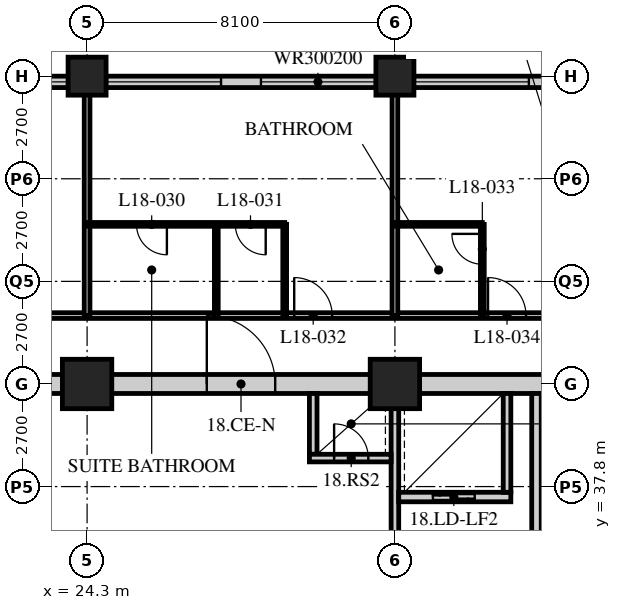
"""IFC4 building model, lengths in metres.
Left out: names, types, materials, properties, quantities, classifications, styles, units other than length and angle.
Written with IfcOpenShell. Run it as: python <this file> out.ifc"""

import sys

from ifc_helpers import new_model, si_unit, direction, frame, frame_2d, origin, origin_2d, place, context, subcontext, project, spatial, rectangle, hollow_rectangle, extrude, element, fill, save


model = new_model("IFC4")
c1 = context("Model", 3, precision=1e-05, world=origin(), true_north=direction((0.0, 1.0)))
c2 = subcontext(c1, "Body", "Model", "MODEL_VIEW")
j1 = project(units=[si_unit("LENGTHUNIT", "METRE"), si_unit("PLANEANGLEUNIT", "RADIAN")], contexts=[c1])
p1 = place(None, origin())
s1 = spatial("IfcSite", under=j1, at=p1, CompositionType="ELEMENT")
p2 = place(p1, origin())
s2 = spatial("IfcBuilding", under=s1, at=p2, CompositionType="ELEMENT")
p3 = place(p2, frame((0.0, 0.0, 73.8)))
s3 = spatial("IfcBuildingStorey", under=s2, at=p3, CompositionType="ELEMENT", Elevation=73.8)
p4 = place(p3, frame((24.3, 40.5, 0.0), z_axis=(0.0, 0.0, 1.0), x_axis=(1.0, 0.0, 0.0)))
e1 = element("IfcColumn", 1, at=p4, inside=s3, PredefinedType="COLUMN", context=c2, shape_type="SweptSolid", body=[
    extrude(hollow_rectangle(XDim=1.3, YDim=1.3, WallThickness=0.13, at=origin_2d()), origin(), (0.0, 0.0, 1.0), 3.4),
])
p5 = place(p3, frame((24.3, 48.6, 0.0), z_axis=(0.0, 0.0, 1.0), x_axis=(1.0, 0.0, 0.0)))
e2 = element("IfcColumn", 2, at=p5, inside=s3, PredefinedType="COLUMN", context=c2, shape_type="SweptSolid", body=[
    extrude(hollow_rectangle(XDim=1.0, YDim=1.0, WallThickness=0.1, at=origin_2d()), origin(), (0.0, 0.0, 1.0), 3.4),
])
p6 = place(p3, frame((32.4, 40.5, 0.0), z_axis=(0.0, 0.0, 1.0), x_axis=(1.0, 0.0, 0.0)))
e3 = element("IfcColumn", 3, at=p6, inside=s3, PredefinedType="COLUMN", context=c2, shape_type="SweptSolid", body=[
    extrude(hollow_rectangle(XDim=1.3, YDim=1.3, WallThickness=0.13, at=origin_2d()), origin(), (0.0, 0.0, 1.0), 3.4),
])
p7 = place(p3, frame((32.4, 48.6, 0.0), z_axis=(0.0, 0.0, 1.0), x_axis=(1.0, 0.0, 0.0)))
e4 = element("IfcColumn", 4, at=p7, inside=s3, PredefinedType="COLUMN", context=c2, shape_type="SweptSolid", body=[
    extrude(hollow_rectangle(XDim=1.0, YDim=1.0, WallThickness=0.1, at=origin_2d()), origin(), (0.0, 0.0, 1.0), 3.4),
])
p8 = place(p3, frame((48.3, 48.45, 0.0), z_axis=(0.0, 0.0, 1.0), x_axis=(-1.0, 0.0, 0.0)))
e5 = element("IfcWall", 5, at=p8, inside=s3, PredefinedType="SOLIDWALL", context=c2, shape_type="SweptSolid", body=[
    extrude(rectangle(XDim=40.2, YDim=0.3, at=frame_2d((20.1, 0.0))), origin(), (0.0, 0.0, 1.0), 3.19),
])
p9 = place(p8, frame((0.225, 0.0, 0.9)))
e6 = element("IfcOpeningElement", 6, at=p9, cuts=e5, PredefinedType="OPENING", context=c2, shape_type="SweptSolid", body=[
    extrude(rectangle(XDim=3.0, YDim=2.0, at=frame_2d((1.5, 1.0))), frame((0.0, 0.16, 0.0), z_axis=(0.0, -1.0, 0.0), x_axis=(1.0, 0.0, 0.0)), (0.0, 0.0, 1.0), 0.32),
])
p10 = place(p8, frame((4.275, 0.0, 0.9)))
e7 = element("IfcOpeningElement", 7, at=p10, cuts=e5, PredefinedType="OPENING", context=c2, shape_type="SweptSolid", body=[
    extrude(rectangle(XDim=3.0, YDim=2.0, at=frame_2d((1.5, 1.0))), frame((0.0, 0.16, 0.0), z_axis=(0.0, -1.0, 0.0), x_axis=(1.0, 0.0, 0.0)), (0.0, 0.0, 1.0), 0.32),
])
p11 = place(p8, frame((8.325, 0.0, 0.9)))
e8 = element("IfcOpeningElement", 8, at=p11, cuts=e5, PredefinedType="OPENING", context=c2, shape_type="SweptSolid", body=[
    extrude(rectangle(XDim=3.0, YDim=2.0, at=frame_2d((1.5, 1.0))), frame((0.0, 0.16, 0.0), z_axis=(0.0, -1.0, 0.0), x_axis=(1.0, 0.0, 0.0)), (0.0, 0.0, 1.0), 0.32),
])
p12 = place(p8, frame((12.375, 0.0, 0.9)))
e9 = element("IfcOpeningElement", 9, at=p12, cuts=e5, PredefinedType="OPENING", context=c2, shape_type="SweptSolid", body=[
    extrude(rectangle(XDim=3.0, YDim=2.0, at=frame_2d((1.5, 1.0))), frame((0.0, 0.16, 0.0), z_axis=(0.0, -1.0, 0.0), x_axis=(1.0, 0.0, 0.0)), (0.0, 0.0, 1.0), 0.32),
])
p13 = place(p8, frame((16.425, 0.0, 0.9)))
e10 = element("IfcOpeningElement", 10, at=p13, cuts=e5, PredefinedType="OPENING", context=c2, shape_type="SweptSolid", body=[
    extrude(rectangle(XDim=3.0, YDim=2.0, at=frame_2d((1.5, 1.0))), frame((0.0, 0.16, 0.0), z_axis=(0.0, -1.0, 0.0), x_axis=(1.0, 0.0, 0.0)), (0.0, 0.0, 1.0), 0.32),
])
p14 = place(p8, frame((20.475, 0.0, 0.9)))
e11 = element("IfcOpeningElement", 11, at=p14, cuts=e5, PredefinedType="OPENING", context=c2, shape_type="SweptSolid", body=[
    extrude(rectangle(XDim=3.0, YDim=2.0, at=frame_2d((1.5, 1.0))), frame((0.0, 0.16, 0.0), z_axis=(0.0, -1.0, 0.0), x_axis=(1.0, 0.0, 0.0)), (0.0, 0.0, 1.0), 0.32),
])
p15 = place(p8, frame((24.525, 0.0, 0.9)))
e12 = element("IfcOpeningElement", 12, at=p15, cuts=e5, PredefinedType="OPENING", context=c2, shape_type="SweptSolid", body=[
    extrude(rectangle(XDim=3.0, YDim=2.0, at=frame_2d((1.5, 1.0))), frame((0.0, 0.16, 0.0), z_axis=(0.0, -1.0, 0.0), x_axis=(1.0, 0.0, 0.0)), (0.0, 0.0, 1.0), 0.32),
])
p16 = place(p8, frame((28.575, 0.0, 0.9)))
e13 = element("IfcOpeningElement", 13, at=p16, cuts=e5, PredefinedType="OPENING", context=c2, shape_type="SweptSolid", body=[
    extrude(rectangle(XDim=3.0, YDim=2.0, at=frame_2d((1.5, 1.0))), frame((0.0, 0.16, 0.0), z_axis=(0.0, -1.0, 0.0), x_axis=(1.0, 0.0, 0.0)), (0.0, 0.0, 1.0), 0.32),
])
p17 = place(p8, frame((32.625, 0.0, 0.9)))
e14 = element("IfcOpeningElement", 14, at=p17, cuts=e5, PredefinedType="OPENING", context=c2, shape_type="SweptSolid", body=[
    extrude(rectangle(XDim=3.0, YDim=2.0, at=frame_2d((1.5, 1.0))), frame((0.0, 0.16, 0.0), z_axis=(0.0, -1.0, 0.0), x_axis=(1.0, 0.0, 0.0)), (0.0, 0.0, 1.0), 0.32),
])
p18 = place(p8, frame((36.675, 0.0, 0.9)))
e15 = element("IfcOpeningElement", 15, at=p18, cuts=e5, PredefinedType="OPENING", context=c2, shape_type="SweptSolid", body=[
    extrude(rectangle(XDim=3.0, YDim=2.0, at=frame_2d((1.5, 1.0))), frame((0.0, 0.16, 0.0), z_axis=(0.0, -1.0, 0.0), x_axis=(1.0, 0.0, 0.0)), (0.0, 0.0, 1.0), 0.32),
])
p19 = place(p3, frame((12.15, 42.3, 0.0), z_axis=(0.0, 0.0, 1.0), x_axis=(1.0, 0.0, 0.0)))
e16 = element("IfcWall", 16, at=p19, inside=s3, PredefinedType="PARTITIONING", context=c2, shape_type="SweptSolid", body=[
    extrude(rectangle(XDim=36.45, YDim=0.15, at=frame_2d((18.225, 0.0))), origin(), (0.0, 0.0, 1.0), 3.19),
])
p20 = place(p19, frame((9.5, 0.0, 0.0)))
e17 = element("IfcOpeningElement", 17, at=p20, cuts=e16, PredefinedType="OPENING", context=c2, shape_type="SweptSolid", body=[
    extrude(rectangle(XDim=1.0, YDim=2.1, at=frame_2d((0.5, 1.05))), frame((0.0, 0.085, 0.0), z_axis=(0.0, -1.0, 0.0), x_axis=(1.0, 0.0, 0.0)), (0.0, 0.0, 1.0), 0.17),
])
p21 = place(p19, frame((17.6, 0.0, 0.0)))
e18 = element("IfcOpeningElement", 18, at=p21, cuts=e16, PredefinedType="OPENING", context=c2, shape_type="SweptSolid", body=[
    extrude(rectangle(XDim=1.0, YDim=2.1, at=frame_2d((0.5, 1.05))), frame((0.0, 0.085, 0.0), z_axis=(0.0, -1.0, 0.0), x_axis=(1.0, 0.0, 0.0)), (0.0, 0.0, 1.0), 0.17),
])
p22 = place(p19, frame((22.7, 0.0, 0.0)))
e19 = element("IfcOpeningElement", 19, at=p22, cuts=e16, PredefinedType="OPENING", context=c2, shape_type="SweptSolid", body=[
    extrude(rectangle(XDim=1.0, YDim=2.1, at=frame_2d((0.5, 1.05))), frame((0.0, 0.085, 0.0), z_axis=(0.0, -1.0, 0.0), x_axis=(1.0, 0.0, 0.0)), (0.0, 0.0, 1.0), 0.17),
])
p23 = place(p19, frame((26.75, 0.0, 0.0)))
e20 = element("IfcOpeningElement", 20, at=p23, cuts=e16, PredefinedType="OPENING", context=c2, shape_type="SweptSolid", body=[
    extrude(rectangle(XDim=1.0, YDim=2.1, at=frame_2d((0.5, 1.05))), frame((0.0, 0.085, 0.0), z_axis=(0.0, -1.0, 0.0), x_axis=(1.0, 0.0, 0.0)), (0.0, 0.0, 1.0), 0.17),
])
p24 = place(p19, frame((30.8, 0.0, 0.0)))
e21 = element("IfcOpeningElement", 21, at=p24, cuts=e16, PredefinedType="OPENING", context=c2, shape_type="SweptSolid", body=[
    extrude(rectangle(XDim=1.0, YDim=2.1, at=frame_2d((0.5, 1.05))), frame((0.0, 0.085, 0.0), z_axis=(0.0, -1.0, 0.0), x_axis=(1.0, 0.0, 0.0)), (0.0, 0.0, 1.0), 0.17),
])
p25 = place(p19, frame((32.825, 0.0, 0.0)))
e22 = element("IfcOpeningElement", 22, at=p25, cuts=e16, PredefinedType="OPENING", context=c2, shape_type="SweptSolid", body=[
    extrude(rectangle(XDim=1.0, YDim=2.1, at=frame_2d((0.5, 1.05))), frame((0.0, 0.085, 0.0), z_axis=(0.0, -1.0, 0.0), x_axis=(1.0, 0.0, 0.0)), (0.0, 0.0, 1.0), 0.17),
])
p26 = place(p19, frame((2.625, 0.0, 0.0)))
e23 = element("IfcOpeningElement", 23, at=p26, cuts=e16, PredefinedType="OPENING", context=c2, shape_type="SweptSolid", body=[
    extrude(rectangle(XDim=1.0, YDim=2.1, at=frame_2d((0.5, 1.05))), frame((0.0, 0.085, 0.0), z_axis=(0.0, -1.0, 0.0), x_axis=(1.0, 0.0, 0.0)), (0.0, 0.0, 1.0), 0.17),
])
p27 = place(p3, frame((24.3, 42.3, 0.0), z_axis=(0.0, 0.0, 1.0), x_axis=(0.0, 1.0, 0.0)))
e24 = element("IfcWall", 24, at=p27, inside=s3, PredefinedType="PARTITIONING", context=c2, shape_type="SweptSolid", body=[
    extrude(rectangle(XDim=6.0, YDim=0.15, at=frame_2d((3.0, 0.0))), origin(), (0.0, 0.0, 1.0), 2.578),
])
p28 = place(p3, frame((24.3, 44.7, 0.0), z_axis=(0.0, 0.0, 1.0), x_axis=(1.0, 0.0, 0.0)))
e25 = element("IfcWall", 25, at=p28, inside=s3, PredefinedType="PARTITIONING", context=c2, shape_type="SweptSolid", body=[
    extrude(rectangle(XDim=5.2, YDim=0.1, at=frame_2d((2.6, 0.0))), origin(), (0.0, 0.0, 1.0), 3.19),
])
p29 = place(p28, frame((1.3, 0.0, 0.0)))
e26 = element("IfcOpeningElement", 26, at=p29, cuts=e25, PredefinedType="OPENING", context=c2, shape_type="SweptSolid", body=[
    extrude(rectangle(XDim=0.8, YDim=2.1, at=frame_2d((0.4, 1.05))), frame((0.0, 0.06, 0.0), z_axis=(0.0, -1.0, 0.0), x_axis=(1.0, 0.0, 0.0)), (0.0, 0.0, 1.0), 0.12),
])
p30 = place(p28, frame((3.9, 0.0, 0.0)))
e27 = element("IfcOpeningElement", 27, at=p30, cuts=e25, PredefinedType="OPENING", context=c2, shape_type="SweptSolid", body=[
    extrude(rectangle(XDim=0.8, YDim=2.1, at=frame_2d((0.4, 1.05))), frame((0.0, 0.06, 0.0), z_axis=(0.0, -1.0, 0.0), x_axis=(1.0, 0.0, 0.0)), (0.0, 0.0, 1.0), 0.12),
])
for number, where, z_axis, x_axis in (
    (28, (27.7, 42.3, 0.0), (0.0, 0.0, 1.0), (0.0, 1.0, 0.0)),
    (29, (29.5, 42.3, 0.0), (0.0, 0.0, 1.0), (0.0, 1.0, 0.0)),
):
    element("IfcWall", number, at=place(p3, frame(where, z_axis=z_axis, x_axis=x_axis)), inside=s3, PredefinedType="PARTITIONING", context=c2, shape_type="SweptSolid", body=[
        extrude(rectangle(XDim=2.4, YDim=0.1, at=frame_2d((1.2, 0.0))), origin(), (0.0, 0.0, 1.0), 3.19),
    ])
p31 = place(p3, frame((32.4, 42.3, 0.0), z_axis=(0.0, 0.0, 1.0), x_axis=(0.0, 1.0, 0.0)))
e30 = element("IfcWall", 30, at=p31, inside=s3, PredefinedType="PARTITIONING", context=c2, shape_type="SweptSolid", body=[
    extrude(rectangle(XDim=6.0, YDim=0.15, at=frame_2d((3.0, 0.0))), origin(), (0.0, 0.0, 1.0), 2.578),
])
p32 = place(p3, frame((32.4, 44.7, 0.0), z_axis=(0.0, 0.0, 1.0), x_axis=(1.0, 0.0, 0.0)))
e31 = element("IfcWall", 31, at=p32, inside=s3, PredefinedType="PARTITIONING", context=c2, shape_type="SweptSolid", body=[
    extrude(rectangle(XDim=2.3, YDim=0.1, at=frame_2d((1.15, 0.0))), origin(), (0.0, 0.0, 1.0), 3.19),
])
p33 = place(p3, frame((34.7, 42.3, 0.0), z_axis=(0.0, 0.0, 1.0), x_axis=(0.0, 1.0, 0.0)))
e32 = element("IfcWall", 32, at=p33, inside=s3, PredefinedType="PARTITIONING", context=c2, shape_type="SweptSolid", body=[
    extrude(rectangle(XDim=2.4, YDim=0.1, at=frame_2d((1.2, 0.0))), origin(), (0.0, 0.0, 1.0), 3.19),
])
p34 = place(p33, frame((1.35, 0.0, 0.0)))
e33 = element("IfcOpeningElement", 33, at=p34, cuts=e32, PredefinedType="OPENING", context=c2, shape_type="SweptSolid", body=[
    extrude(rectangle(XDim=0.8, YDim=2.1, at=frame_2d((0.4, 1.05))), frame((0.0, 0.06, 0.0), z_axis=(0.0, -1.0, 0.0), x_axis=(1.0, 0.0, 0.0)), (0.0, 0.0, 1.0), 0.12),
])
p35 = place(p3, frame((15.95, 40.5, 0.0), z_axis=(0.0, 0.0, 1.0), x_axis=(1.0, 0.0, 0.0)))
e34 = element("IfcWall", 34, at=p35, inside=s3, PredefinedType="SOLIDWALL", context=c2, shape_type="SweptSolid", body=[
    extrude(rectangle(XDim=24.8, YDim=0.5, at=frame_2d((12.4, 0.0))), origin(), (0.0, 0.0, 1.0), 2.54),
])
p36 = place(p35, frame((11.5, 0.0, 0.0)))
e35 = element("IfcOpeningElement", 35, at=p36, cuts=e34, PredefinedType="OPENING", context=c2, shape_type="SweptSolid", body=[
    extrude(rectangle(XDim=1.8, YDim=2.4, at=frame_2d((0.9, 1.2))), frame((0.0, 0.26, 0.0), z_axis=(0.0, -1.0, 0.0), x_axis=(1.0, 0.0, 0.0)), (0.0, 0.0, 1.0), 0.52),
])
p37 = place(p3, frame((32.4, 32.5, 0.0), z_axis=(0.0, 0.0, 1.0), x_axis=(0.0, 1.0, 0.0)))
e36 = element("IfcWall", 36, at=p37, inside=s3, PredefinedType="SOLIDWALL", context=c2, shape_type="SweptSolid", body=[
    extrude(rectangle(XDim=7.75, YDim=0.2, at=frame_2d((3.875, 0.0))), origin(), (0.0, 0.0, 1.0), 2.578),
])
p38 = place(p37, frame((1.9, 0.0, 0.0)))
e37 = element("IfcOpeningElement", 37, at=p38, cuts=e36, PredefinedType="OPENING", context=c2, shape_type="SweptSolid", body=[
    extrude(rectangle(XDim=1.2, YDim=2.1, at=frame_2d((0.6, 1.05))), frame((0.0, 0.11, 0.0), z_axis=(0.0, -1.0, 0.0), x_axis=(1.0, 0.0, 0.0)), (0.0, 0.0, 1.0), 0.22),
])
p39 = place(p3, frame((36.125, 32.5, 0.0), z_axis=(0.0, 0.0, 1.0), x_axis=(0.0, 1.0, 0.0)))
e38 = element("IfcWall", 38, at=p39, inside=s3, PredefinedType="SOLIDWALL", context=c2, shape_type="SweptSolid", body=[
    extrude(rectangle(XDim=7.75, YDim=0.25, at=frame_2d((3.875, 0.0))), origin(), (0.0, 0.0, 1.0), 3.19),
])
p40 = place(p39, frame((0.45, 0.0, 0.0)))
e39 = element("IfcOpeningElement", 39, at=p40, cuts=e38, PredefinedType="OPENING", context=c2, shape_type="SweptSolid", body=[
    extrude(rectangle(XDim=1.2, YDim=2.1, at=frame_2d((0.6, 1.05))), frame((0.0, 0.135, 0.0), z_axis=(0.0, -1.0, 0.0), x_axis=(1.0, 0.0, 0.0)), (0.0, 0.0, 1.0), 0.27),
])
p41 = place(p3, frame((32.5, 37.525, 0.0), z_axis=(0.0, 0.0, 1.0), x_axis=(1.0, 0.0, 0.0)))
e40 = element("IfcWall", 40, at=p41, inside=s3, PredefinedType="SOLIDWALL", context=c2, shape_type="SweptSolid", body=[
    extrude(rectangle(XDim=2.95, YDim=0.25, at=frame_2d((1.475, 0.0))), origin(), (0.0, 0.0, 1.0), 3.19),
])
p42 = place(p41, frame((0.9, 0.0, 0.0)))
e41 = element("IfcOpeningElement", 41, at=p42, cuts=e40, PredefinedType="OPENING", context=c2, shape_type="SweptSolid", body=[
    extrude(rectangle(XDim=1.1, YDim=2.4, at=frame_2d((0.55, 1.2))), frame((0.0, 0.135, 0.0), z_axis=(0.0, -1.0, 0.0), x_axis=(1.0, 0.0, 0.0)), (0.0, 0.0, 1.0), 0.27),
])
p43 = place(p3, frame((35.35, 37.65, 0.0), z_axis=(0.0, 0.0, 1.0), x_axis=(0.0, 1.0, 0.0)))
e42 = element("IfcWall", 42, at=p43, inside=s3, PredefinedType="SOLIDWALL", context=c2, shape_type="SweptSolid", body=[
    extrude(rectangle(XDim=2.6, YDim=0.2, at=frame_2d((1.3, 0.0))), origin(), (0.0, 0.0, 1.0), 3.19),
])
p44 = place(p3, frame((30.25, 38.65, 0.0), z_axis=(0.0, 0.0, 1.0), x_axis=(0.0, 1.0, 0.0)))
e43 = element("IfcWall", 43, at=p44, inside=s3, PredefinedType="SOLIDWALL", context=c2, shape_type="SweptSolid", body=[
    extrude(rectangle(XDim=1.6, YDim=0.2, at=frame_2d((0.8, 0.0))), origin(), (0.0, 0.0, 1.0), 3.19),
])
p45 = place(p3, frame((30.15, 38.55, 0.0), z_axis=(0.0, 0.0, 1.0), x_axis=(1.0, 0.0, 0.0)))
e44 = element("IfcWall", 44, at=p45, inside=s3, PredefinedType="SOLIDWALL", context=c2, shape_type="SweptSolid", body=[
    extrude(rectangle(XDim=2.15, YDim=0.2, at=frame_2d((1.075, 0.0))), origin(), (0.0, 0.0, 1.0), 3.19),
])
p46 = place(p45, frame((0.65, 0.0, 0.0)))
e45 = element("IfcOpeningElement", 45, at=p46, cuts=e44, PredefinedType="OPENING", context=c2, shape_type="SweptSolid", body=[
    extrude(rectangle(XDim=0.9, YDim=2.1, at=frame_2d((0.45, 1.05))), frame((0.0, 0.11, 0.0), z_axis=(0.0, -1.0, 0.0), x_axis=(1.0, 0.0, 0.0)), (0.0, 0.0, 1.0), 0.22),
])
p47 = place(p12, origin())
e46 = element("IfcWindow", 46, at=p47, inside=s3, PartitioningType="SINGLE_PANEL", PredefinedType="WINDOW", context=c2, shape_type="SweptSolid", body=[
    extrude(rectangle(XDim=3.0, YDim=2.0, at=frame_2d((1.5, 1.0))), frame((0.0, 0.03, 0.0), z_axis=(0.0, -1.0, 0.0), x_axis=(1.0, 0.0, 0.0)), (0.0, 0.0, 1.0), 0.06),
])
fill(e9, e46)
p48 = place(p13, origin())
e47 = element("IfcWindow", 47, at=p48, inside=s3, PartitioningType="SINGLE_PANEL", PredefinedType="WINDOW", context=c2, shape_type="SweptSolid", body=[
    extrude(rectangle(XDim=3.0, YDim=2.0, at=frame_2d((1.5, 1.0))), frame((0.0, 0.03, 0.0), z_axis=(0.0, -1.0, 0.0), x_axis=(1.0, 0.0, 0.0)), (0.0, 0.0, 1.0), 0.06),
])
fill(e10, e47)
p49 = place(p14, origin())
e48 = element("IfcWindow", 48, at=p49, inside=s3, PartitioningType="SINGLE_PANEL", PredefinedType="WINDOW", context=c2, shape_type="SweptSolid", body=[
    extrude(rectangle(XDim=3.0, YDim=2.0, at=frame_2d((1.5, 1.0))), frame((0.0, 0.03, 0.0), z_axis=(0.0, -1.0, 0.0), x_axis=(1.0, 0.0, 0.0)), (0.0, 0.0, 1.0), 0.06),
])
fill(e11, e48)
p50 = place(p15, origin())
e49 = element("IfcWindow", 49, at=p50, inside=s3, PartitioningType="SINGLE_PANEL", PredefinedType="WINDOW", context=c2, shape_type="SweptSolid", body=[
    extrude(rectangle(XDim=3.0, YDim=2.0, at=frame_2d((1.5, 1.0))), frame((0.0, 0.03, 0.0), z_axis=(0.0, -1.0, 0.0), x_axis=(1.0, 0.0, 0.0)), (0.0, 0.0, 1.0), 0.06),
])
fill(e12, e49)
p51 = place(p29, origin())
e50 = element("IfcDoor", 50, at=p51, inside=s3, OperationType="SINGLE_SWING_LEFT", PredefinedType="DOOR", context=c2, shape_type="SweptSolid", body=[
    extrude(rectangle(XDim=0.8, YDim=2.1, at=frame_2d((0.4, 1.05))), frame((0.0, 0.025, 0.0), z_axis=(0.0, -1.0, 0.0), x_axis=(1.0, 0.0, 0.0)), (0.0, 0.0, 1.0), 0.05),
])
fill(e26, e50)
p52 = place(p30, origin())
e51 = element("IfcDoor", 51, at=p52, inside=s3, OperationType="SINGLE_SWING_LEFT", PredefinedType="DOOR", context=c2, shape_type="SweptSolid", body=[
    extrude(rectangle(XDim=0.8, YDim=2.1, at=frame_2d((0.4, 1.05))), frame((0.0, 0.025, 0.0), z_axis=(0.0, -1.0, 0.0), x_axis=(1.0, 0.0, 0.0)), (0.0, 0.0, 1.0), 0.05),
])
fill(e27, e51)
p53 = place(p21, origin())
e52 = element("IfcDoor", 52, at=p53, inside=s3, OperationType="SINGLE_SWING_LEFT", PredefinedType="DOOR", context=c2, shape_type="SweptSolid", body=[
    extrude(rectangle(XDim=1.0, YDim=2.1, at=frame_2d((0.5, 1.05))), frame((0.0, 0.025, 0.0), z_axis=(0.0, -1.0, 0.0), x_axis=(1.0, 0.0, 0.0)), (0.0, 0.0, 1.0), 0.05),
])
fill(e18, e52)
p54 = place(p34, origin())
e53 = element("IfcDoor", 53, at=p54, inside=s3, OperationType="SINGLE_SWING_RIGHT", PredefinedType="DOOR", context=c2, shape_type="SweptSolid", body=[
    extrude(rectangle(XDim=0.8, YDim=2.1, at=frame_2d((0.4, 1.05))), frame((0.0, 0.025, 0.0), z_axis=(0.0, -1.0, 0.0), x_axis=(1.0, 0.0, 0.0)), (0.0, 0.0, 1.0), 0.05),
])
fill(e33, e53)
p55 = place(p22, origin())
e54 = element("IfcDoor", 54, at=p55, inside=s3, OperationType="SINGLE_SWING_LEFT", PredefinedType="DOOR", context=c2, shape_type="SweptSolid", body=[
    extrude(rectangle(XDim=1.0, YDim=2.1, at=frame_2d((0.5, 1.05))), frame((0.0, 0.025, 0.0), z_axis=(0.0, -1.0, 0.0), x_axis=(1.0, 0.0, 0.0)), (0.0, 0.0, 1.0), 0.05),
])
fill(e19, e54)
p56 = place(p46, origin())
e55 = element("IfcDoor", 55, at=p56, inside=s3, OperationType="SINGLE_SWING_LEFT", PredefinedType="DOOR", context=c2, shape_type="SweptSolid", body=[
    extrude(rectangle(XDim=0.9, YDim=2.1, at=frame_2d((0.45, 1.05))), frame((0.0, 0.025, 0.0), z_axis=(0.0, -1.0, 0.0), x_axis=(1.0, 0.0, 0.0)), (0.0, 0.0, 1.0), 0.05),
])
fill(e45, e55)
p57 = place(p42, origin())
e56 = element("IfcDoor", 56, at=p57, inside=s3, OperationType="DOUBLE_DOOR_SLIDING", PredefinedType="DOOR", context=c2, shape_type="SweptSolid", body=[
    extrude(rectangle(XDim=1.1, YDim=2.4, at=frame_2d((0.55, 1.2))), frame((0.0, 0.025, 0.0), z_axis=(0.0, -1.0, 0.0), x_axis=(1.0, 0.0, 0.0)), (0.0, 0.0, 1.0), 0.05),
])
fill(e41, e56)
p58 = place(p36, origin())
e57 = element("IfcDoor", 57, at=p58, inside=s3, OperationType="DOUBLE_DOOR_SINGLE_SWING", PredefinedType="DOOR", context=c2, shape_type="SweptSolid", body=[
    extrude(rectangle(XDim=1.8, YDim=2.4, at=frame_2d((0.9, 1.2))), frame((0.0, 0.025, 0.0), z_axis=(0.0, -1.0, 0.0), x_axis=(1.0, 0.0, 0.0)), (0.0, 0.0, 1.0), 0.05),
])
fill(e35, e57)
save(model, sys.argv[1])
